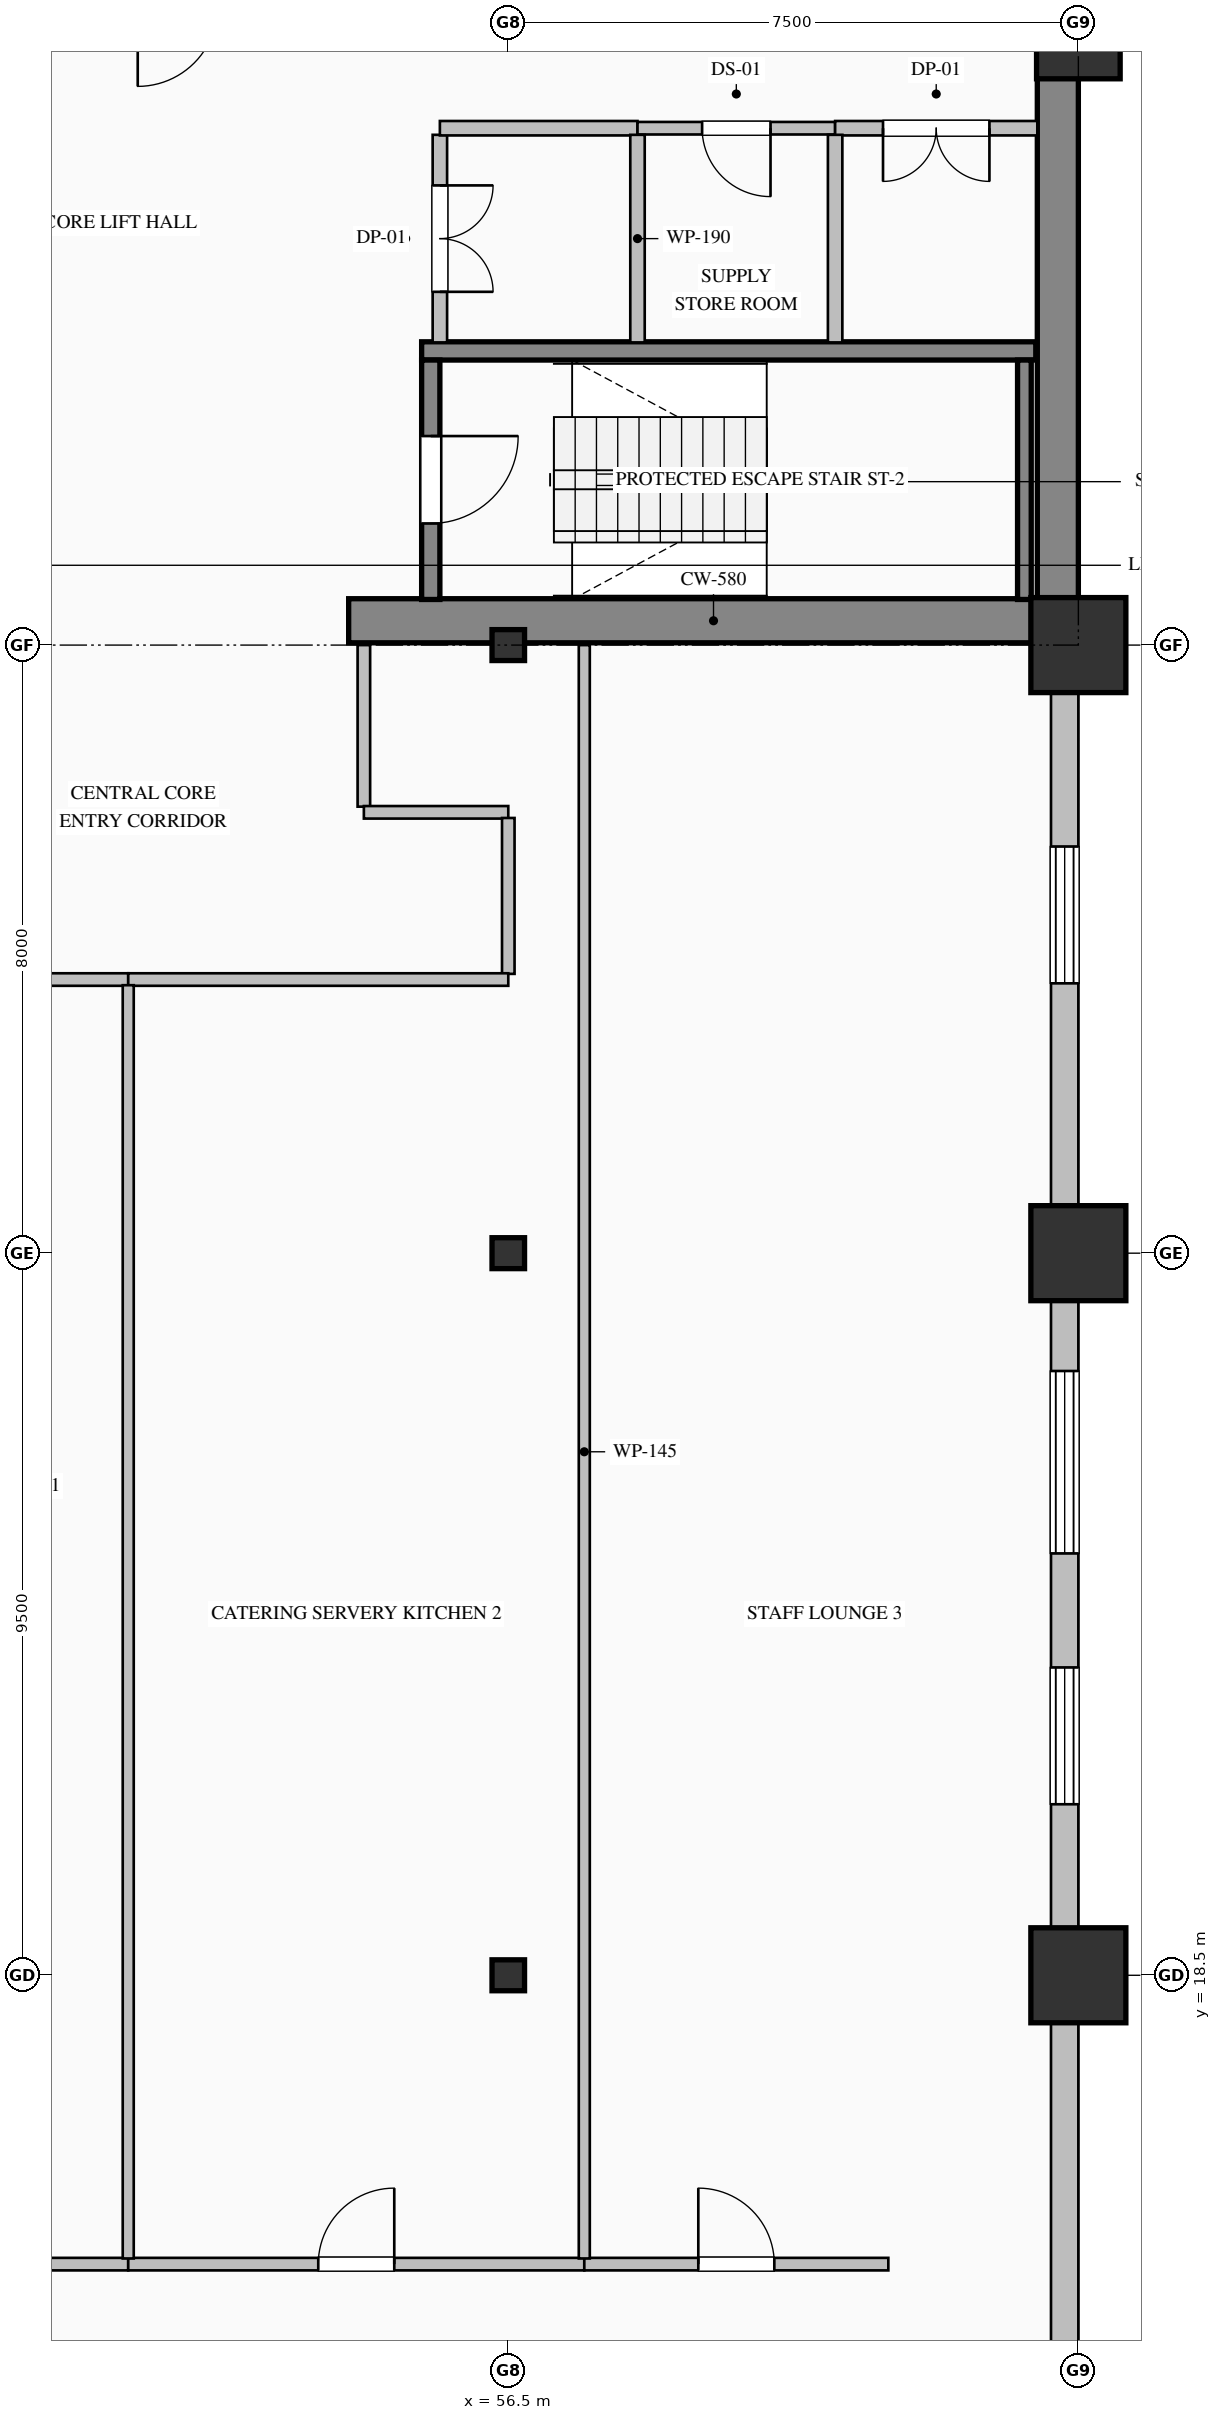
"""IFC4 building model, lengths in metres.
Left out: names, types, materials, properties, quantities, classifications, styles, units other than length and angle.
Written with IfcOpenShell. Run it as: python <this file> out.ifc"""

import sys

from ifc_helpers import new_model, si_unit, direction, frame, frame_2d, origin, origin_2d, place, context, subcontext, project, spatial, rectangle, hollow_rectangle, i_section, extrude, element, fill, save


model = new_model("IFC4")
c1 = context("Model", 3, precision=1e-05, world=origin(), true_north=direction((0.0, 1.0)))
c2 = subcontext(c1, "Body", "Model", "MODEL_VIEW")
j1 = project(units=[si_unit("LENGTHUNIT", "METRE"), si_unit("PLANEANGLEUNIT", "RADIAN")], contexts=[c1])
p1 = place(None, origin())
s1 = spatial("IfcSite", under=j1, at=p1, CompositionType="ELEMENT")
p2 = place(p1, origin())
s2 = spatial("IfcBuilding", under=s1, at=p2, CompositionType="ELEMENT")
p3 = place(p2, frame((0.0, 0.0, 76.2)))
s3 = spatial("IfcBuildingStorey", under=s2, at=p3, CompositionType="ELEMENT", Elevation=76.2)
p4 = place(p3, frame((63.73, 36.32, 0.0), z_axis=(0.0, 0.0, 1.0), x_axis=(0.0, 1.0, 0.0)))
e1 = element("IfcWall", 1, at=p4, inside=s3, PredefinedType="SHEAR", context=c2, shape_type="SweptSolid", body=[
    extrude(rectangle(XDim=15.14, YDim=0.54, at=frame_2d((7.57, 0.0))), origin(), (0.0, 0.0, 1.0), 3.75),
])
p5 = place(p3, frame((54.4, 36.32, 0.0), z_axis=(0.0, 0.0, 1.0), x_axis=(1.0, 0.0, 0.0)))
e2 = element("IfcWall", 2, at=p5, inside=s3, PredefinedType="SHEAR", context=c2, shape_type="SweptSolid", body=[
    extrude(rectangle(XDim=9.6, YDim=0.58, at=frame_2d((4.8, 0.0))), origin(), (0.0, 0.0, 1.0), 4.0),
])
for number, where, z_axis, x_axis in (
    (3, (56.5, 18.5, 0.0), (0.0, 0.0, 1.0), (1.0, 0.0, 0.0)),
    (4, (56.5, 28.0, 0.0), (0.0, 0.0, 1.0), (1.0, 0.0, 0.0)),
    (5, (56.5, 36.0, 0.0), (0.0, 0.0, 1.0), (1.0, 0.0, 0.0)),
):
    element("IfcColumn", number, at=place(p3, frame(where, z_axis=z_axis, x_axis=x_axis)), inside=s3, PredefinedType="COLUMN", context=c2, shape_type="SweptSolid", body=[
        extrude(i_section(OverallWidth=0.407, OverallDepth=0.428, WebThickness=0.02, FlangeThickness=0.035, FilletRadius=0.022, at=origin_2d()), origin(), (0.0, 0.0, 1.0), 4.0),
    ])
for number, where, z_axis, x_axis in (
    (6, (64.0, 18.5, 0.0), (0.0, 0.0, 1.0), (1.0, 0.0, 0.0)),
    (7, (64.0, 28.0, 0.0), (0.0, 0.0, 1.0), (1.0, 0.0, 0.0)),
    (8, (64.0, 36.0, 0.0), (0.0, 0.0, 1.0), (1.0, 0.0, 0.0)),
):
    element("IfcColumn", number, at=place(p3, frame(where, z_axis=z_axis, x_axis=x_axis)), inside=s3, PredefinedType="COLUMN", context=c2, shape_type="SweptSolid", body=[
        extrude(hollow_rectangle(XDim=1.25, YDim=1.25, WallThickness=0.045, at=origin_2d()), origin(), (0.0, 0.0, 1.0), 4.0),
    ])
p6 = place(p3, frame((64.0, 44.0, 0.0), z_axis=(0.0, 0.0, 1.0), x_axis=(1.0, 0.0, 0.0)))
e9 = element("IfcColumn", 9, at=p6, inside=s3, PredefinedType="COLUMN", context=c2, shape_type="SweptSolid", body=[
    extrude(hollow_rectangle(XDim=1.1, YDim=1.1, WallThickness=0.04, at=origin_2d()), origin(), (0.0, 0.0, 1.0), 4.0),
])
p7 = place(p3, frame((63.82, 36.05, 0.0), z_axis=(0.0, 0.0, 1.0), x_axis=(0.0, -1.0, 0.0)))
e10 = element("IfcWall", 10, at=p7, inside=s3, PredefinedType="SOLIDWALL", context=c2, shape_type="SweptSolid", body=[
    extrude(rectangle(XDim=28.05, YDim=0.36, at=frame_2d((14.025, 0.0))), origin(), (0.0, 0.0, 1.0), 3.25),
])
p8 = place(p7, frame((2.7, 0.0, 0.85)))
e11 = element("IfcOpeningElement", 11, at=p8, cuts=e10, PredefinedType="OPENING", context=c2, shape_type="SweptSolid", body=[
    extrude(rectangle(XDim=1.8, YDim=2.05, at=frame_2d((0.9, 1.025))), frame((0.0, 0.19, 0.0), z_axis=(0.0, -1.0, 0.0), x_axis=(1.0, 0.0, 0.0)), (0.0, 0.0, 1.0), 0.38),
])
p9 = place(p7, frame((9.6, 0.0, 0.8)))
e12 = element("IfcOpeningElement", 12, at=p9, cuts=e10, PredefinedType="OPENING", context=c2, shape_type="SweptSolid", body=[
    extrude(rectangle(XDim=2.4, YDim=2.15, at=frame_2d((1.2, 1.075))), frame((0.0, 0.19, 0.0), z_axis=(0.0, -1.0, 0.0), x_axis=(1.0, 0.0, 0.0)), (0.0, 0.0, 1.0), 0.38),
])
p10 = place(p7, frame((13.5, 0.0, 0.85)))
e13 = element("IfcOpeningElement", 13, at=p10, cuts=e10, PredefinedType="OPENING", context=c2, shape_type="SweptSolid", body=[
    extrude(rectangle(XDim=1.8, YDim=2.05, at=frame_2d((0.9, 1.025))), frame((0.0, 0.19, 0.0), z_axis=(0.0, -1.0, 0.0), x_axis=(1.0, 0.0, 0.0)), (0.0, 0.0, 1.0), 0.38),
])
p11 = place(p3, frame((55.36, 39.87, 0.0), z_axis=(0.0, 0.0, 1.0), x_axis=(1.0, 0.0, 0.0)))
e14 = element("IfcWall", 14, at=p11, inside=s3, PredefinedType="SOLIDWALL", context=c2, shape_type="SweptSolid", body=[
    extrude(rectangle(XDim=8.08, YDim=0.24, at=frame_2d((4.04, 0.0))), origin(), (0.0, 0.0, 1.0), 4.0),
])
p12 = place(p3, frame((55.48, 39.75, 0.0), z_axis=(0.0, 0.0, 1.0), x_axis=(0.0, -1.0, 0.0)))
e15 = element("IfcWall", 15, at=p12, inside=s3, PredefinedType="SOLIDWALL", context=c2, shape_type="SweptSolid", body=[
    extrude(rectangle(XDim=3.15, YDim=0.24, at=frame_2d((1.575, 0.0))), origin(), (0.0, 0.0, 1.0), 4.0),
])
p13 = place(p12, frame((1.0, 0.0, 0.0)))
e16 = element("IfcOpeningElement", 16, at=p13, cuts=e15, PredefinedType="OPENING", context=c2, shape_type="SweptSolid", body=[
    extrude(rectangle(XDim=1.15, YDim=2.2, at=frame_2d((0.575, 1.1))), frame((0.0, 0.13, 0.0), z_axis=(0.0, -1.0, 0.0), x_axis=(1.0, 0.0, 0.0)), (0.0, 0.0, 1.0), 0.26),
])
p14 = place(p3, frame((63.29, 36.6, 0.0), z_axis=(0.0, 0.0, 1.0), x_axis=(0.0, 1.0, 0.0)))
e17 = element("IfcWall", 17, at=p14, inside=s3, PredefinedType="SOLIDWALL", context=c2, shape_type="SweptSolid", body=[
    extrude(rectangle(XDim=3.15, YDim=0.18, at=frame_2d((1.575, 0.0))), origin(), (0.0, 0.0, 1.0), 4.0),
])
p15 = place(p3, frame((55.6, 42.713, 0.0), z_axis=(0.0, 0.0, 1.0), x_axis=(0.0, -1.0, 0.0)))
e18 = element("IfcWall", 18, at=p15, inside=s3, PredefinedType="PARTITIONING", context=c2, shape_type="SweptSolid", body=[
    extrude(rectangle(XDim=2.731, YDim=0.19, at=frame_2d((1.365, 0.0))), origin(), (0.0, 0.0, 1.0), 3.75),
])
p16 = place(p15, frame((0.666, 0.0, 0.0)))
e19 = element("IfcOpeningElement", 19, at=p16, cuts=e18, PredefinedType="OPENING", context=c2, shape_type="SweptSolid", body=[
    extrude(rectangle(XDim=1.4, YDim=2.25, at=frame_2d((0.7, 1.125))), frame((0.0, 0.105, 0.0), z_axis=(0.0, -1.0, 0.0), x_axis=(1.0, 0.0, 0.0)), (0.0, 0.0, 1.0), 0.21),
])
p17 = place(p3, frame((58.2, 42.8, 0.0), z_axis=(0.0, 0.0, 1.0), x_axis=(-1.0, 0.0, 0.0)))
e20 = element("IfcWall", 20, at=p17, inside=s3, PredefinedType="PARTITIONING", context=c2, shape_type="SweptSolid", body=[
    extrude(rectangle(XDim=2.6, YDim=0.19, at=frame_2d((1.3, 0.0))), origin(), (0.0, 0.0, 1.0), 3.75),
])
p18 = place(p3, frame((60.8, 42.8, 0.0), z_axis=(0.0, 0.0, 1.0), x_axis=(-1.0, 0.0, 0.0)))
e21 = element("IfcWall", 21, at=p18, inside=s3, PredefinedType="PARTITIONING", context=c2, shape_type="SweptSolid", body=[
    extrude(rectangle(XDim=2.6, YDim=0.165, at=frame_2d((1.3, 0.0))), origin(), (0.0, 0.0, 1.0), 3.75),
])
p19 = place(p18, frame((0.85, 0.0, 0.0)))
e22 = element("IfcOpeningElement", 22, at=p19, cuts=e21, PredefinedType="OPENING", context=c2, shape_type="SweptSolid", body=[
    extrude(rectangle(XDim=0.9, YDim=2.15, at=frame_2d((0.45, 1.075))), frame((0.0, 0.093, 0.0), z_axis=(0.0, -1.0, 0.0), x_axis=(1.0, 0.0, 0.0)), (0.0, 0.0, 1.0), 0.185),
])
p20 = place(p3, frame((63.46, 42.8, 0.0), z_axis=(0.0, 0.0, 1.0), x_axis=(-1.0, 0.0, 0.0)))
e23 = element("IfcWall", 23, at=p20, inside=s3, PredefinedType="PARTITIONING", context=c2, shape_type="SweptSolid", body=[
    extrude(rectangle(XDim=2.66, YDim=0.19, at=frame_2d((1.33, 0.0))), origin(), (0.0, 0.0, 1.0), 3.75),
])
p21 = place(p20, frame((0.63, 0.0, 0.0)))
e24 = element("IfcOpeningElement", 24, at=p21, cuts=e23, PredefinedType="OPENING", context=c2, shape_type="SweptSolid", body=[
    extrude(rectangle(XDim=1.4, YDim=2.25, at=frame_2d((0.7, 1.125))), frame((0.0, 0.105, 0.0), z_axis=(0.0, -1.0, 0.0), x_axis=(1.0, 0.0, 0.0)), (0.0, 0.0, 1.0), 0.21),
])
for number, where, z_axis, x_axis in (
    (25, (58.2, 42.713, 0.0), (0.0, 0.0, 1.0), (0.0, -1.0, 0.0)),
    (26, (60.8, 42.713, 0.0), (0.0, 0.0, 1.0), (0.0, -1.0, 0.0)),
):
    element("IfcWall", number, at=place(p3, frame(where, z_axis=z_axis, x_axis=x_axis)), inside=s3, PredefinedType="PARTITIONING", context=c2, shape_type="SweptSolid", body=[
        extrude(rectangle(XDim=2.731, YDim=0.19, at=frame_2d((1.365, 0.0))), origin(), (0.0, 0.0, 1.0), 3.75),
    ])
p22 = place(p3, frame((51.5, 31.6, 0.0), z_axis=(0.0, 0.0, 1.0), x_axis=(-1.0, 0.0, 0.0)))
e27 = element("IfcWall", 27, at=p22, inside=s3, PredefinedType="PARTITIONING", context=c2, shape_type="SweptSolid", body=[
    extrude(rectangle(XDim=6.3, YDim=0.165, at=frame_2d((3.15, 0.0))), origin(), (0.0, 0.0, 1.0), 3.75),
])
p23 = place(p3, frame((54.6, 36.0, 0.0), z_axis=(0.0, 0.0, 1.0), x_axis=(0.0, -1.0, 0.0)))
e28 = element("IfcWall", 28, at=p23, inside=s3, PredefinedType="PARTITIONING", context=c2, shape_type="SweptSolid", body=[
    extrude(rectangle(XDim=2.125, YDim=0.165, at=frame_2d((1.063, 0.0))), origin(), (0.0, 0.0, 1.0), 3.75),
])
p24 = place(p3, frame((54.6, 33.8, 0.0), z_axis=(0.0, 0.0, 1.0), x_axis=(1.0, 0.0, 0.0)))
e29 = element("IfcWall", 29, at=p24, inside=s3, PredefinedType="PARTITIONING", context=c2, shape_type="SweptSolid", body=[
    extrude(rectangle(XDim=1.9, YDim=0.165, at=frame_2d((0.95, 0.0))), origin(), (0.0, 0.0, 1.0), 3.75),
])
p25 = place(p3, frame((56.5, 33.726, 0.0), z_axis=(0.0, 0.0, 1.0), x_axis=(0.0, -1.0, 0.0)))
e30 = element("IfcWall", 30, at=p25, inside=s3, PredefinedType="PARTITIONING", context=c2, shape_type="SweptSolid", body=[
    extrude(rectangle(XDim=2.051, YDim=0.165, at=frame_2d((1.025, 0.0))), origin(), (0.0, 0.0, 1.0), 3.042),
])
p26 = place(p3, frame((56.5, 31.6, 0.0), z_axis=(0.0, 0.0, 1.0), x_axis=(-1.0, 0.0, 0.0)))
e31 = element("IfcWall", 31, at=p26, inside=s3, PredefinedType="PARTITIONING", context=c2, shape_type="SweptSolid", body=[
    extrude(rectangle(XDim=5.0, YDim=0.165, at=frame_2d((2.5, 0.0))), origin(), (0.0, 0.0, 1.0), 3.75),
])
p27 = place(p3, frame((45.2, 14.7, 0.0), z_axis=(0.0, 0.0, 1.0), x_axis=(1.0, 0.0, 0.0)))
e32 = element("IfcWall", 32, at=p27, inside=s3, PredefinedType="PARTITIONING", context=c2, shape_type="SweptSolid", body=[
    extrude(rectangle(XDim=6.3, YDim=0.165, at=frame_2d((3.15, 0.0))), origin(), (0.0, 0.0, 1.0), 3.75),
])
p28 = place(p3, frame((51.5, 14.7, 0.0), z_axis=(0.0, 0.0, 1.0), x_axis=(1.0, 0.0, 0.0)))
e33 = element("IfcWall", 33, at=p28, inside=s3, PredefinedType="PARTITIONING", context=c2, shape_type="SweptSolid", body=[
    extrude(rectangle(XDim=6.0, YDim=0.165, at=frame_2d((3.0, 0.0))), origin(), (0.0, 0.0, 1.0), 3.75),
])
p29 = place(p28, frame((2.5, 0.0, 0.0)))
e34 = element("IfcOpeningElement", 34, at=p29, cuts=e33, PredefinedType="OPENING", context=c2, shape_type="SweptSolid", body=[
    extrude(rectangle(XDim=1.0, YDim=2.15, at=frame_2d((0.5, 1.075))), frame((0.0, 0.093, 0.0), z_axis=(0.0, -1.0, 0.0), x_axis=(1.0, 0.0, 0.0)), (0.0, 0.0, 1.0), 0.185),
])
p30 = place(p3, frame((57.5, 14.7, 0.0), z_axis=(0.0, 0.0, 1.0), x_axis=(1.0, 0.0, 0.0)))
e35 = element("IfcWall", 35, at=p30, inside=s3, PredefinedType="PARTITIONING", context=c2, shape_type="SweptSolid", body=[
    extrude(rectangle(XDim=4.0, YDim=0.165, at=frame_2d((2.0, 0.0))), origin(), (0.0, 0.0, 1.0), 3.75),
])
p31 = place(p30, frame((1.5, 0.0, 0.0)))
e36 = element("IfcOpeningElement", 36, at=p31, cuts=e35, PredefinedType="OPENING", context=c2, shape_type="SweptSolid", body=[
    extrude(rectangle(XDim=1.0, YDim=2.15, at=frame_2d((0.5, 1.075))), frame((0.0, 0.093, 0.0), z_axis=(0.0, -1.0, 0.0), x_axis=(1.0, 0.0, 0.0)), (0.0, 0.0, 1.0), 0.185),
])
p32 = place(p3, frame((51.5, 31.525, 0.0), z_axis=(0.0, 0.0, 1.0), x_axis=(0.0, -1.0, 0.0)))
e37 = element("IfcWall", 37, at=p32, inside=s3, PredefinedType="PARTITIONING", context=c2, shape_type="SweptSolid", body=[
    extrude(rectangle(XDim=16.751, YDim=0.145, at=frame_2d((8.375, 0.0))), origin(), (0.0, 0.0, 1.0), 3.75),
])
p33 = place(p3, frame((57.5, 36.0, 0.0), z_axis=(0.0, 0.0, 1.0), x_axis=(0.0, -1.0, 0.0)))
e38 = element("IfcWall", 38, at=p33, inside=s3, PredefinedType="PARTITIONING", context=c2, shape_type="SweptSolid", body=[
    extrude(rectangle(XDim=21.226, YDim=0.145, at=frame_2d((10.613, 0.0))), origin(), (0.0, 0.0, 1.0), 3.75),
])
p34 = place(p8, origin())
e39 = element("IfcWindow", 39, at=p34, inside=s3, PartitioningType="TRIPLE_PANEL_VERTICAL", PredefinedType="WINDOW", context=c2, shape_type="SweptSolid", body=[
    extrude(rectangle(XDim=1.8, YDim=2.05, at=frame_2d((0.9, 1.025))), frame((0.0, 0.15, 0.0), z_axis=(0.0, -1.0, 0.0), x_axis=(1.0, 0.0, 0.0)), (0.0, 0.0, 1.0), 0.06),
])
fill(e11, e39)
p35 = place(p9, origin())
e40 = element("IfcWindow", 40, at=p35, inside=s3, PartitioningType="TRIPLE_PANEL_VERTICAL", PredefinedType="WINDOW", context=c2, shape_type="SweptSolid", body=[
    extrude(rectangle(XDim=2.4, YDim=2.15, at=frame_2d((1.2, 1.075))), frame((0.0, 0.15, 0.0), z_axis=(0.0, -1.0, 0.0), x_axis=(1.0, 0.0, 0.0)), (0.0, 0.0, 1.0), 0.06),
])
fill(e12, e40)
p36 = place(p10, origin())
e41 = element("IfcWindow", 41, at=p36, inside=s3, PartitioningType="TRIPLE_PANEL_VERTICAL", PredefinedType="WINDOW", context=c2, shape_type="SweptSolid", body=[
    extrude(rectangle(XDim=1.8, YDim=2.05, at=frame_2d((0.9, 1.025))), frame((0.0, 0.15, 0.0), z_axis=(0.0, -1.0, 0.0), x_axis=(1.0, 0.0, 0.0)), (0.0, 0.0, 1.0), 0.06),
])
fill(e13, e41)
p37 = place(p13, origin())
e42 = element("IfcDoor", 42, at=p37, inside=s3, OperationType="SINGLE_SWING_LEFT", PredefinedType="DOOR", context=c2, shape_type="SweptSolid", body=[
    extrude(rectangle(XDim=1.15, YDim=2.2, at=frame_2d((0.575, 1.1))), frame((0.0, 0.025, 0.0), z_axis=(0.0, -1.0, 0.0), x_axis=(1.0, 0.0, 0.0)), (0.0, 0.0, 1.0), 0.05),
])
fill(e16, e42)
p38 = place(p16, origin())
e43 = element("IfcDoor", 43, at=p38, inside=s3, OperationType="DOUBLE_DOOR_SINGLE_SWING", PredefinedType="DOOR", context=c2, shape_type="SweptSolid", body=[
    extrude(rectangle(XDim=1.4, YDim=2.25, at=frame_2d((0.7, 1.125))), frame((0.0, 0.025, 0.0), z_axis=(0.0, -1.0, 0.0), x_axis=(1.0, 0.0, 0.0)), (0.0, 0.0, 1.0), 0.05),
])
fill(e19, e43)
p39 = place(p19, origin())
e44 = element("IfcDoor", 44, at=p39, inside=s3, OperationType="SINGLE_SWING_LEFT", PredefinedType="DOOR", context=c2, shape_type="SweptSolid", body=[
    extrude(rectangle(XDim=0.9, YDim=2.15, at=frame_2d((0.45, 1.075))), frame((0.0, 0.025, 0.0), z_axis=(0.0, -1.0, 0.0), x_axis=(1.0, 0.0, 0.0)), (0.0, 0.0, 1.0), 0.05),
])
fill(e22, e44)
p40 = place(p21, origin())
e45 = element("IfcDoor", 45, at=p40, inside=s3, OperationType="DOUBLE_DOOR_SINGLE_SWING", PredefinedType="DOOR", context=c2, shape_type="SweptSolid", body=[
    extrude(rectangle(XDim=1.4, YDim=2.25, at=frame_2d((0.7, 1.125))), frame((0.0, 0.025, 0.0), z_axis=(0.0, -1.0, 0.0), x_axis=(1.0, 0.0, 0.0)), (0.0, 0.0, 1.0), 0.05),
])
fill(e24, e45)
p41 = place(p29, origin())
e46 = element("IfcDoor", 46, at=p41, inside=s3, OperationType="SINGLE_SWING_RIGHT", PredefinedType="DOOR", context=c2, shape_type="SweptSolid", body=[
    extrude(rectangle(XDim=1.0, YDim=2.15, at=frame_2d((0.5, 1.075))), frame((0.0, 0.025, 0.0), z_axis=(0.0, -1.0, 0.0), x_axis=(1.0, 0.0, 0.0)), (0.0, 0.0, 1.0), 0.05),
])
fill(e34, e46)
p42 = place(p31, origin())
e47 = element("IfcDoor", 47, at=p42, inside=s3, OperationType="SINGLE_SWING_LEFT", PredefinedType="DOOR", context=c2, shape_type="SweptSolid", body=[
    extrude(rectangle(XDim=1.0, YDim=2.15, at=frame_2d((0.5, 1.075))), frame((0.0, 0.025, 0.0), z_axis=(0.0, -1.0, 0.0), x_axis=(1.0, 0.0, 0.0)), (0.0, 0.0, 1.0), 0.05),
])
fill(e36, e47)
save(model, sys.argv[1])
